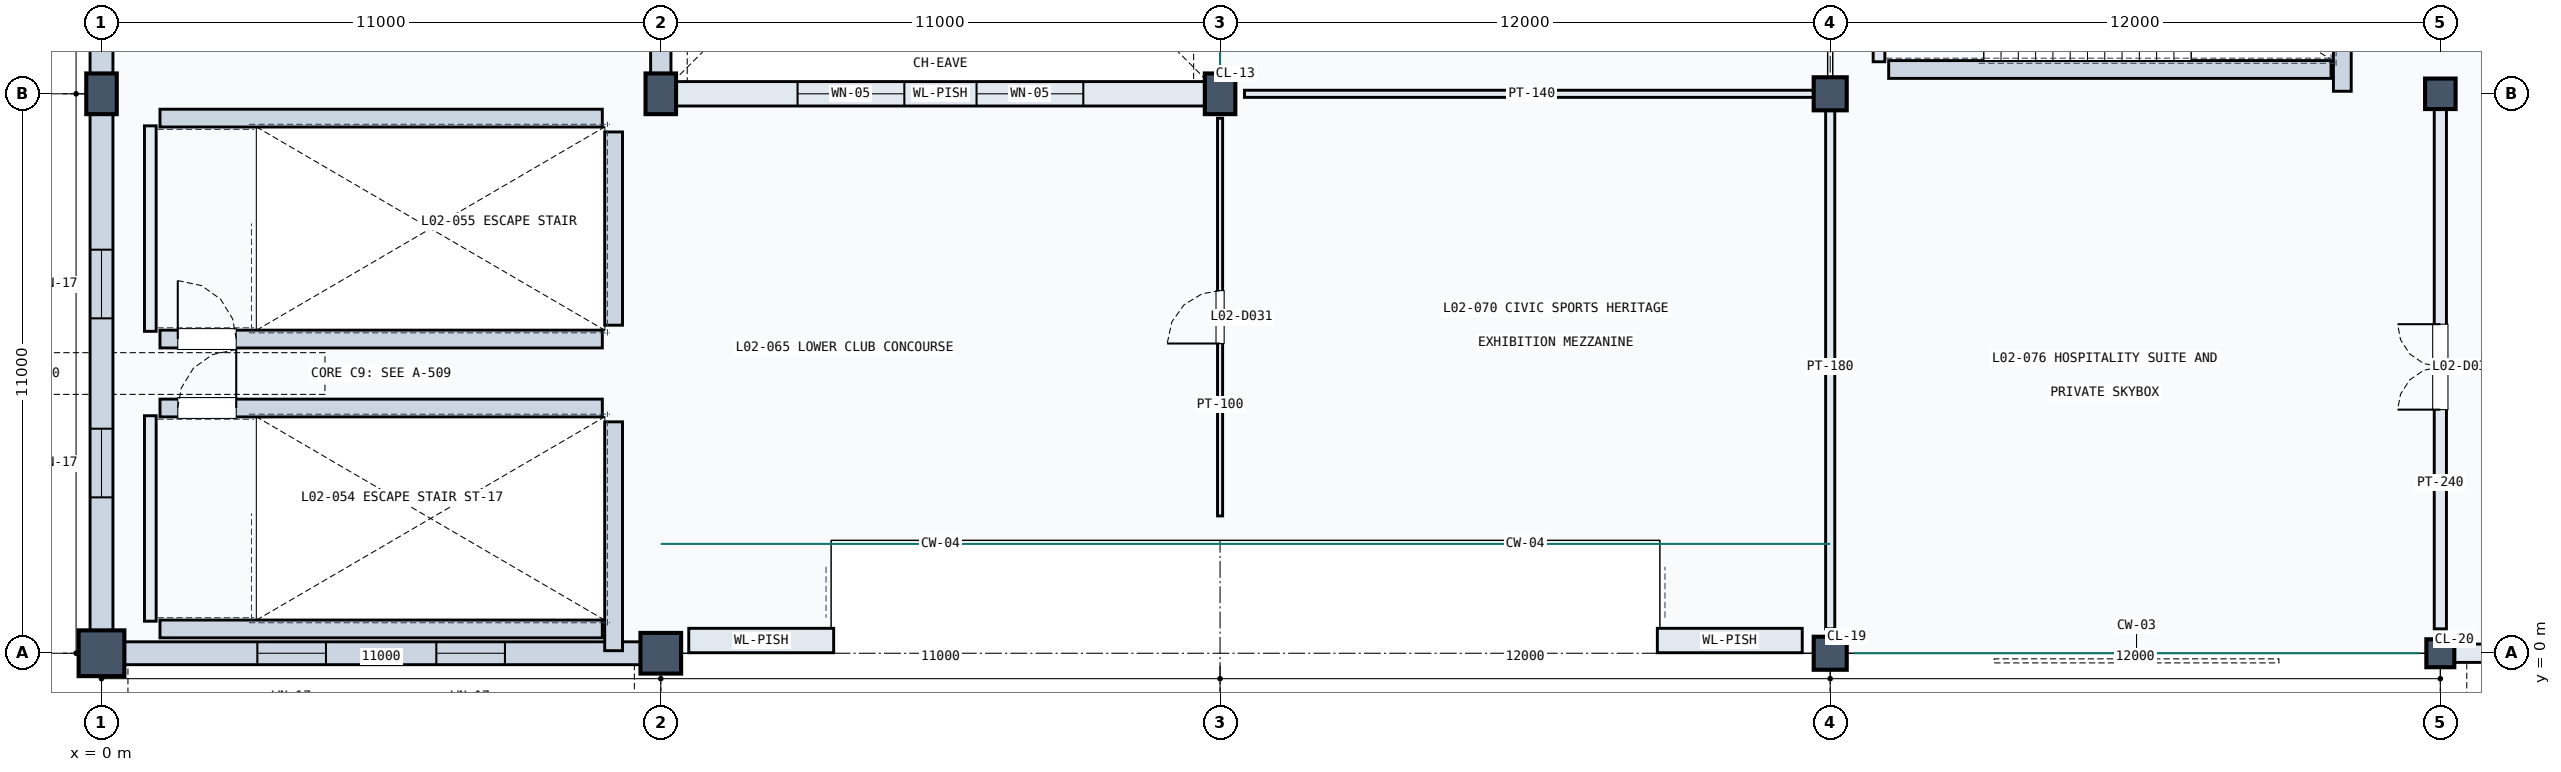
"""IFC4 building model, lengths in metres.
Left out: names, types, materials, properties, quantities, classifications, styles, units other than length and angle.
Written with IfcOpenShell. Run it as: python <this file> out.ifc"""

import sys

from ifc_helpers import new_model, si_unit, direction, frame, frame_2d, origin, origin_with_axes, origin_2d, place, context, subcontext, project, spatial, rectangle, circle, extrude, element, fill, save


model = new_model("IFC4")
c1 = context("Model", 3, precision=1e-05, world=origin(), true_north=direction((0.0, 1.0)))
c2 = subcontext(c1, "Body", "Model", "MODEL_VIEW")
j1 = project(units=[si_unit("LENGTHUNIT", "METRE"), si_unit("PLANEANGLEUNIT", "RADIAN")], contexts=[c1])
p1 = place(None, origin())
s1 = spatial("IfcSite", under=j1, at=p1, CompositionType="ELEMENT")
p2 = place(p1, origin())
s2 = spatial("IfcBuilding", under=s1, at=p2, CompositionType="ELEMENT")
p3 = place(p2, frame((0.0, 0.0, 10.2)))
s3 = spatial("IfcBuildingStorey", under=s2, at=p3, CompositionType="ELEMENT", Elevation=10.2)
p4 = place(p3, origin_with_axes())
e1 = element("IfcColumn", 1, at=p4, inside=s3, PredefinedType="COLUMN", context=c2, shape_type="SweptSolid", body=[
    extrude(circle(Radius=0.45, at=origin_2d()), origin(), (0.0, 0.0, 1.0), 4.5),
])
p5 = place(p3, frame((0.0, 11.0, 0.0), z_axis=(0.0, 0.0, 1.0), x_axis=(1.0, 0.0, 0.0)))
e2 = element("IfcColumn", 2, at=p5, inside=s3, PredefinedType="COLUMN", context=c2, shape_type="SweptSolid", body=[
    extrude(rectangle(XDim=0.6, YDim=0.8, at=origin_2d()), origin(), (0.0, 0.0, 1.0), 4.5),
])
p6 = place(p3, frame((11.0, 0.0, 0.0), z_axis=(0.0, 0.0, 1.0), x_axis=(1.0, 0.0, 0.0)))
e3 = element("IfcColumn", 3, at=p6, inside=s3, PredefinedType="COLUMN", context=c2, shape_type="SweptSolid", body=[
    extrude(circle(Radius=0.4, at=origin_2d()), origin(), (0.0, 0.0, 1.0), 4.5),
])
for number, where, z_axis, x_axis in (
    (4, (11.0, 11.0, 0.0), (0.0, 0.0, 1.0), (1.0, 0.0, 0.0)),
    (5, (22.0, 11.0, 0.0), (0.0, 0.0, 1.0), (1.0, 0.0, 0.0)),
):
    element("IfcColumn", number, at=place(p3, frame(where, z_axis=z_axis, x_axis=x_axis)), inside=s3, PredefinedType="COLUMN", context=c2, shape_type="SweptSolid", body=[
        extrude(rectangle(XDim=0.6, YDim=0.8, at=origin_2d()), origin(), (0.0, 0.0, 1.0), 4.5),
    ])
p7 = place(p3, frame((34.0, 0.0, 0.0), z_axis=(0.0, 0.0, 1.0), x_axis=(1.0, 0.0, 0.0)))
e6 = element("IfcColumn", 6, at=p7, inside=s3, PredefinedType="COLUMN", context=c2, shape_type="SweptSolid", body=[
    extrude(circle(Radius=0.325, at=origin_2d()), origin(), (0.0, 0.0, 1.0), 4.5),
])
p8 = place(p3, frame((34.0, 11.0, 0.0), z_axis=(0.0, 0.0, 1.0), x_axis=(1.0, 0.0, 0.0)))
e7 = element("IfcColumn", 7, at=p8, inside=s3, PredefinedType="COLUMN", context=c2, shape_type="SweptSolid", body=[
    extrude(rectangle(XDim=0.65, YDim=0.65, at=origin_2d()), origin(), (0.0, 0.0, 1.0), 4.5),
])
p9 = place(p3, frame((46.0, 0.0, 0.0), z_axis=(0.0, 0.0, 1.0), x_axis=(1.0, 0.0, 0.0)))
e8 = element("IfcColumn", 8, at=p9, inside=s3, PredefinedType="COLUMN", context=c2, shape_type="SweptSolid", body=[
    extrude(circle(Radius=0.275, at=origin_2d()), origin(), (0.0, 0.0, 1.0), 4.5),
])
p10 = place(p3, frame((46.0, 11.0, 0.0), z_axis=(0.0, 0.0, 1.0), x_axis=(1.0, 0.0, 0.0)))
e9 = element("IfcColumn", 9, at=p10, inside=s3, PredefinedType="COLUMN", context=c2, shape_type="SweptSolid", body=[
    extrude(rectangle(XDim=0.6, YDim=0.6, at=origin_2d()), origin(), (0.0, 0.0, 1.0), 4.5),
])
for number, where, z_axis, x_axis in (
    (10, (11.55, 0.25, 0.0), (0.0, 0.0, 1.0), (1.0, 0.0, 0.0)),
    (11, (30.6, 0.25, 0.0), (0.0, 0.0, 1.0), (1.0, 0.0, 0.0)),
):
    element("IfcWall", number, at=place(p3, frame(where, z_axis=z_axis, x_axis=x_axis)), inside=s3, PredefinedType="SOLIDWALL", context=c2, shape_type="SweptSolid", body=[
        extrude(rectangle(XDim=2.85, YDim=0.48, at=frame_2d((1.425, 0.0))), origin(), (0.0, 0.0, 1.0), 4.14),
    ])
p11 = place(p3, frame((0.22, 0.0, 0.0), z_axis=(0.0, 0.0, 1.0), x_axis=(1.0, 0.0, 0.0)))
e12 = element("IfcWall", 12, at=p11, inside=s3, PredefinedType="SOLIDWALL", context=c2, shape_type="SweptSolid", body=[
    extrude(rectangle(XDim=10.56, YDim=0.45, at=frame_2d((5.28, 0.0))), origin(), (0.0, 0.0, 1.0), 3.405),
])
p12 = place(p11, frame((2.845, 0.0, 0.8)))
e13 = element("IfcOpeningElement", 13, at=p12, cuts=e12, PredefinedType="OPENING", context=c2, shape_type="SweptSolid", body=[
    extrude(rectangle(XDim=1.35, YDim=2.1, at=frame_2d((0.675, 1.05))), frame((0.0, 0.235, 0.0), z_axis=(0.0, -1.0, 0.0), x_axis=(1.0, 0.0, 0.0)), (0.0, 0.0, 1.0), 0.47),
])
p13 = place(p11, frame((6.365, 0.0, 0.8)))
e14 = element("IfcOpeningElement", 14, at=p13, cuts=e12, PredefinedType="OPENING", context=c2, shape_type="SweptSolid", body=[
    extrude(rectangle(XDim=1.35, YDim=2.1, at=frame_2d((0.675, 1.05))), frame((0.0, 0.235, 0.0), z_axis=(0.0, -1.0, 0.0), x_axis=(1.0, 0.0, 0.0)), (0.0, 0.0, 1.0), 0.47),
])
p14 = place(p3, frame((0.0, 0.22, 0.0), z_axis=(0.0, 0.0, 1.0), x_axis=(0.0, 1.0, 0.0)))
e15 = element("IfcWall", 15, at=p14, inside=s3, PredefinedType="SOLIDWALL", context=c2, shape_type="SweptSolid", body=[
    extrude(rectangle(XDim=10.56, YDim=0.45, at=frame_2d((5.28, 0.0))), origin(), (0.0, 0.0, 1.0), 3.405),
])
p15 = place(p14, frame((2.845, 0.0, 0.8)))
e16 = element("IfcOpeningElement", 16, at=p15, cuts=e15, PredefinedType="OPENING", context=c2, shape_type="SweptSolid", body=[
    extrude(rectangle(XDim=1.35, YDim=2.1, at=frame_2d((0.675, 1.05))), frame((0.0, 0.235, 0.0), z_axis=(0.0, -1.0, 0.0), x_axis=(1.0, 0.0, 0.0)), (0.0, 0.0, 1.0), 0.47),
])
p16 = place(p14, frame((6.365, 0.0, 0.8)))
e17 = element("IfcOpeningElement", 17, at=p16, cuts=e15, PredefinedType="OPENING", context=c2, shape_type="SweptSolid", body=[
    extrude(rectangle(XDim=1.35, YDim=2.1, at=frame_2d((0.675, 1.05))), frame((0.0, 0.235, 0.0), z_axis=(0.0, -1.0, 0.0), x_axis=(1.0, 0.0, 0.0)), (0.0, 0.0, 1.0), 0.47),
])
p17 = place(p3, frame((0.0, 11.22, 0.0), z_axis=(0.0, 0.0, 1.0), x_axis=(0.0, 1.0, 0.0)))
e18 = element("IfcWall", 18, at=p17, inside=s3, PredefinedType="SOLIDWALL", context=c2, shape_type="SweptSolid", body=[
    extrude(rectangle(XDim=10.56, YDim=0.45, at=frame_2d((5.28, 0.0))), origin(), (0.0, 0.0, 1.0), 3.405),
])
p18 = place(p17, frame((2.845, 0.0, 0.8)))
e19 = element("IfcOpeningElement", 19, at=p18, cuts=e18, PredefinedType="OPENING", context=c2, shape_type="SweptSolid", body=[
    extrude(rectangle(XDim=1.35, YDim=2.1, at=frame_2d((0.675, 1.05))), frame((0.0, 0.235, 0.0), z_axis=(0.0, -1.0, 0.0), x_axis=(1.0, 0.0, 0.0)), (0.0, 0.0, 1.0), 0.47),
])
p19 = place(p17, frame((6.365, 0.0, 0.8)))
e20 = element("IfcOpeningElement", 20, at=p19, cuts=e18, PredefinedType="OPENING", context=c2, shape_type="SweptSolid", body=[
    extrude(rectangle(XDim=1.35, YDim=2.1, at=frame_2d((0.675, 1.05))), frame((0.0, 0.235, 0.0), z_axis=(0.0, -1.0, 0.0), x_axis=(1.0, 0.0, 0.0)), (0.0, 0.0, 1.0), 0.47),
])
p20 = place(p3, frame((11.0, 11.22, 0.0), z_axis=(0.0, 0.0, 1.0), x_axis=(0.0, 1.0, 0.0)))
e21 = element("IfcWall", 21, at=p20, inside=s3, PredefinedType="SOLIDWALL", context=c2, shape_type="SweptSolid", body=[
    extrude(rectangle(XDim=10.78, YDim=0.4, at=frame_2d((5.39, 0.0))), origin(), (0.0, 0.0, 1.0), 3.405),
])
p21 = place(p20, frame((2.918, 0.0, 0.8)))
e22 = element("IfcOpeningElement", 22, at=p21, cuts=e21, PredefinedType="OPENING", context=c2, shape_type="SweptSolid", body=[
    extrude(rectangle(XDim=1.35, YDim=2.1, at=frame_2d((0.675, 1.05))), frame((0.0, 0.21, 0.0), z_axis=(0.0, -1.0, 0.0), x_axis=(1.0, 0.0, 0.0)), (0.0, 0.0, 1.0), 0.42),
])
p22 = place(p20, frame((6.512, 0.0, 0.8)))
e23 = element("IfcOpeningElement", 23, at=p22, cuts=e21, PredefinedType="OPENING", context=c2, shape_type="SweptSolid", body=[
    extrude(rectangle(XDim=1.35, YDim=2.1, at=frame_2d((0.675, 1.05))), frame((0.0, 0.21, 0.0), z_axis=(0.0, -1.0, 0.0), x_axis=(1.0, 0.0, 0.0)), (0.0, 0.0, 1.0), 0.42),
])
p23 = place(p3, frame((11.22, 11.0, 0.0), z_axis=(0.0, 0.0, 1.0), x_axis=(1.0, 0.0, 0.0)))
e24 = element("IfcWall", 24, at=p23, inside=s3, PredefinedType="SOLIDWALL", context=c2, shape_type="SweptSolid", body=[
    extrude(rectangle(XDim=10.56, YDim=0.48, at=frame_2d((5.28, 0.0))), origin(), (0.0, 0.0, 1.0), 3.405),
])
p24 = place(p23, frame((2.47, 0.0, 0.9)))
e25 = element("IfcOpeningElement", 25, at=p24, cuts=e24, PredefinedType="OPENING", context=c2, shape_type="SweptSolid", body=[
    extrude(rectangle(XDim=2.1, YDim=1.8, at=frame_2d((1.05, 0.9))), frame((0.0, 0.25, 0.0), z_axis=(0.0, -1.0, 0.0), x_axis=(1.0, 0.0, 0.0)), (0.0, 0.0, 1.0), 0.5),
])
p25 = place(p23, frame((5.99, 0.0, 0.9)))
e26 = element("IfcOpeningElement", 26, at=p25, cuts=e24, PredefinedType="OPENING", context=c2, shape_type="SweptSolid", body=[
    extrude(rectangle(XDim=2.1, YDim=1.8, at=frame_2d((1.05, 0.9))), frame((0.0, 0.25, 0.0), z_axis=(0.0, -1.0, 0.0), x_axis=(1.0, 0.0, 0.0)), (0.0, 0.0, 1.0), 0.5),
])
p26 = place(p3, frame((46.22, 0.0, 0.0), z_axis=(0.0, 0.0, 1.0), x_axis=(1.0, 0.0, 0.0)))
e27 = element("IfcWall", 27, at=p26, inside=s3, PredefinedType="SOLIDWALL", context=c2, shape_type="SweptSolid", body=[
    extrude(rectangle(XDim=11.56, YDim=0.36, at=frame_2d((5.78, 0.0))), origin(), (0.0, 0.0, 1.0), 3.405),
])
p27 = place(p26, frame((4.38, 0.0, 0.95)))
e28 = element("IfcOpeningElement", 28, at=p27, cuts=e27, PredefinedType="OPENING", context=c2, shape_type="SweptSolid", body=[
    extrude(rectangle(XDim=2.8, YDim=1.5, at=frame_2d((1.4, 0.75))), frame((0.0, 0.19, 0.0), z_axis=(0.0, -1.0, 0.0), x_axis=(1.0, 0.0, 0.0)), (0.0, 0.0, 1.0), 0.38),
])
p28 = place(p3, frame((34.96, 11.63, 0.0), z_axis=(0.0, 0.0, 1.0), x_axis=(0.0, 1.0, 0.0)))
e29 = element("IfcWall", 29, at=p28, inside=s3, PredefinedType="SOLIDWALL", context=c2, shape_type="SweptSolid", body=[
    extrude(rectangle(XDim=4.08, YDim=0.23, at=frame_2d((2.04, 0.0))), origin(), (0.0, 0.0, 1.0), 4.14),
])
p29 = place(p3, frame((44.072, 11.05, 0.0), z_axis=(0.0, 0.0, 1.0), x_axis=(0.0, 1.0, 0.0)))
e30 = element("IfcWall", 30, at=p29, inside=s3, PredefinedType="SOLIDWALL", context=c2, shape_type="SweptSolid", body=[
    extrude(rectangle(XDim=4.54, YDim=0.35, at=frame_2d((2.27, 0.0))), origin(), (0.0, 0.0, 1.0), 4.14),
])
p30 = place(p3, frame((35.15, 11.478, 0.0), z_axis=(0.0, 0.0, 1.0), x_axis=(1.0, 0.0, 0.0)))
e31 = element("IfcWall", 31, at=p30, inside=s3, PredefinedType="SOLIDWALL", context=c2, shape_type="SweptSolid", body=[
    extrude(rectangle(XDim=8.7, YDim=0.35, at=frame_2d((4.35, 0.0))), origin(), (0.0, 0.0, 1.0), 4.14),
])
p31 = place(p3, frame((0.96, 0.63, 0.0), z_axis=(0.0, 0.0, 1.0), x_axis=(0.0, 1.0, 0.0)))
e32 = element("IfcWall", 32, at=p31, inside=s3, PredefinedType="SOLIDWALL", context=c2, shape_type="SweptSolid", body=[
    extrude(rectangle(XDim=4.04, YDim=0.23, at=frame_2d((2.02, 0.0))), origin(), (0.0, 0.0, 1.0), 4.14),
])
p32 = place(p3, frame((10.072, 0.05, 0.0), z_axis=(0.0, 0.0, 1.0), x_axis=(0.0, 1.0, 0.0)))
e33 = element("IfcWall", 33, at=p32, inside=s3, PredefinedType="SOLIDWALL", context=c2, shape_type="SweptSolid", body=[
    extrude(rectangle(XDim=4.5, YDim=0.35, at=frame_2d((2.25, 0.0))), origin(), (0.0, 0.0, 1.0), 4.14),
])
p33 = place(p3, frame((1.15, 0.478, 0.0), z_axis=(0.0, 0.0, 1.0), x_axis=(1.0, 0.0, 0.0)))
e34 = element("IfcWall", 34, at=p33, inside=s3, PredefinedType="SOLIDWALL", context=c2, shape_type="SweptSolid", body=[
    extrude(rectangle(XDim=8.7, YDim=0.35, at=frame_2d((4.35, 0.0))), origin(), (0.0, 0.0, 1.0), 4.14),
])
p34 = place(p3, frame((1.15, 4.822, 0.0), z_axis=(0.0, 0.0, 1.0), x_axis=(1.0, 0.0, 0.0)))
e35 = element("IfcWall", 35, at=p34, inside=s3, PredefinedType="SOLIDWALL", context=c2, shape_type="SweptSolid", body=[
    extrude(rectangle(XDim=8.7, YDim=0.35, at=frame_2d((4.35, 0.0))), origin(), (0.0, 0.0, 1.0), 4.14),
])
p35 = place(p34, frame((0.35, 0.0, 0.0)))
e36 = element("IfcOpeningElement", 36, at=p35, cuts=e35, PredefinedType="OPENING", context=c2, shape_type="SweptSolid", body=[
    extrude(rectangle(XDim=1.15, YDim=2.2, at=frame_2d((0.575, 1.1))), frame((0.0, 0.185, 0.0), z_axis=(0.0, -1.0, 0.0), x_axis=(1.0, 0.0, 0.0)), (0.0, 0.0, 1.0), 0.37),
])
p36 = place(p3, frame((0.96, 6.33, 0.0), z_axis=(0.0, 0.0, 1.0), x_axis=(0.0, 1.0, 0.0)))
e37 = element("IfcWall", 37, at=p36, inside=s3, PredefinedType="SOLIDWALL", context=c2, shape_type="SweptSolid", body=[
    extrude(rectangle(XDim=4.04, YDim=0.23, at=frame_2d((2.02, 0.0))), origin(), (0.0, 0.0, 1.0), 4.14),
])
p37 = place(p3, frame((10.072, 6.45, 0.0), z_axis=(0.0, 0.0, 1.0), x_axis=(0.0, 1.0, 0.0)))
e38 = element("IfcWall", 38, at=p37, inside=s3, PredefinedType="SOLIDWALL", context=c2, shape_type="SweptSolid", body=[
    extrude(rectangle(XDim=3.8, YDim=0.35, at=frame_2d((1.9, 0.0))), origin(), (0.0, 0.0, 1.0), 4.14),
])
p38 = place(p3, frame((1.15, 6.178, 0.0), z_axis=(0.0, 0.0, 1.0), x_axis=(1.0, 0.0, 0.0)))
e39 = element("IfcWall", 39, at=p38, inside=s3, PredefinedType="SOLIDWALL", context=c2, shape_type="SweptSolid", body=[
    extrude(rectangle(XDim=8.7, YDim=0.35, at=frame_2d((4.35, 0.0))), origin(), (0.0, 0.0, 1.0), 4.14),
])
p39 = place(p38, frame((0.35, 0.0, 0.0)))
e40 = element("IfcOpeningElement", 40, at=p39, cuts=e39, PredefinedType="OPENING", context=c2, shape_type="SweptSolid", body=[
    extrude(rectangle(XDim=1.15, YDim=2.2, at=frame_2d((0.575, 1.1))), frame((0.0, 0.185, 0.0), z_axis=(0.0, -1.0, 0.0), x_axis=(1.0, 0.0, 0.0)), (0.0, 0.0, 1.0), 0.37),
])
p40 = place(p3, frame((1.15, 10.522, 0.0), z_axis=(0.0, 0.0, 1.0), x_axis=(1.0, 0.0, 0.0)))
e41 = element("IfcWall", 41, at=p40, inside=s3, PredefinedType="SOLIDWALL", context=c2, shape_type="SweptSolid", body=[
    extrude(rectangle(XDim=8.7, YDim=0.35, at=frame_2d((4.35, 0.0))), origin(), (0.0, 0.0, 1.0), 4.14),
])
p41 = place(p3, frame((22.0, 2.7, 0.0), z_axis=(0.0, 0.0, 1.0), x_axis=(0.0, 1.0, 0.0)))
e42 = element("IfcWall", 42, at=p41, inside=s3, PredefinedType="PARTITIONING", context=c2, shape_type="SweptSolid", body=[
    extrude(rectangle(XDim=7.82, YDim=0.1, at=frame_2d((3.91, 0.0))), origin(), (0.0, 0.0, 1.0), 4.14),
])
p42 = place(p41, frame((3.39, 0.0, 0.0)))
e43 = element("IfcOpeningElement", 43, at=p42, cuts=e42, PredefinedType="OPENING", context=c2, shape_type="SweptSolid", body=[
    extrude(rectangle(XDim=1.04, YDim=2.15, at=frame_2d((0.52, 1.075))), frame((0.0, 0.06, 0.0), z_axis=(0.0, -1.0, 0.0), x_axis=(1.0, 0.0, 0.0)), (0.0, 0.0, 1.0), 0.12),
])
p43 = place(p3, frame((22.48, 11.0, 0.0), z_axis=(0.0, 0.0, 1.0), x_axis=(1.0, 0.0, 0.0)))
e44 = element("IfcWall", 44, at=p43, inside=s3, PredefinedType="PARTITIONING", context=c2, shape_type="SweptSolid", body=[
    extrude(rectangle(XDim=11.3, YDim=0.14, at=frame_2d((5.65, 0.0))), origin(), (0.0, 0.0, 1.0), 3.405),
])
p44 = place(p3, frame((46.0, 0.48, 0.0), z_axis=(0.0, 0.0, 1.0), x_axis=(0.0, 1.0, 0.0)))
e45 = element("IfcWall", 45, at=p44, inside=s3, PredefinedType="PARTITIONING", context=c2, shape_type="SweptSolid", body=[
    extrude(rectangle(XDim=10.3, YDim=0.24, at=frame_2d((5.15, 0.0))), origin(), (0.0, 0.0, 1.0), 3.39),
])
p45 = place(p44, frame((4.31, 0.0, 0.0)))
e46 = element("IfcOpeningElement", 46, at=p45, cuts=e45, PredefinedType="OPENING", context=c2, shape_type="SweptSolid", body=[
    extrude(rectangle(XDim=1.68, YDim=2.2, at=frame_2d((0.84, 1.1))), frame((0.0, 0.13, 0.0), z_axis=(0.0, -1.0, 0.0), x_axis=(1.0, 0.0, 0.0)), (0.0, 0.0, 1.0), 0.26),
])
p46 = place(p3, frame((34.0, 0.48, 0.0), z_axis=(0.0, 0.0, 1.0), x_axis=(0.0, 1.0, 0.0)))
e47 = element("IfcWall", 47, at=p46, inside=s3, PredefinedType="PARTITIONING", context=c2, shape_type="SweptSolid", body=[
    extrude(rectangle(XDim=10.3, YDim=0.18, at=frame_2d((5.15, 0.0))), origin(), (0.0, 0.0, 1.0), 3.405),
])
p47 = place(p12, origin())
e48 = element("IfcWindow", 48, at=p47, inside=s3, PartitioningType="SINGLE_PANEL", PredefinedType="WINDOW", context=c2, shape_type="SweptSolid", body=[
    extrude(rectangle(XDim=1.35, YDim=2.1, at=frame_2d((0.675, 1.05))), frame((0.0, 0.03, 0.0), z_axis=(0.0, -1.0, 0.0), x_axis=(1.0, 0.0, 0.0)), (0.0, 0.0, 1.0), 0.06),
])
fill(e13, e48)
p48 = place(p13, origin())
e49 = element("IfcWindow", 49, at=p48, inside=s3, PartitioningType="SINGLE_PANEL", PredefinedType="WINDOW", context=c2, shape_type="SweptSolid", body=[
    extrude(rectangle(XDim=1.35, YDim=2.1, at=frame_2d((0.675, 1.05))), frame((0.0, 0.03, 0.0), z_axis=(0.0, -1.0, 0.0), x_axis=(1.0, 0.0, 0.0)), (0.0, 0.0, 1.0), 0.06),
])
fill(e14, e49)
p49 = place(p15, origin())
e50 = element("IfcWindow", 50, at=p49, inside=s3, PartitioningType="SINGLE_PANEL", PredefinedType="WINDOW", context=c2, shape_type="SweptSolid", body=[
    extrude(rectangle(XDim=1.35, YDim=2.1, at=frame_2d((0.675, 1.05))), frame((0.0, 0.03, 0.0), z_axis=(0.0, -1.0, 0.0), x_axis=(1.0, 0.0, 0.0)), (0.0, 0.0, 1.0), 0.06),
])
fill(e16, e50)
p50 = place(p16, origin())
e51 = element("IfcWindow", 51, at=p50, inside=s3, PartitioningType="SINGLE_PANEL", PredefinedType="WINDOW", context=c2, shape_type="SweptSolid", body=[
    extrude(rectangle(XDim=1.35, YDim=2.1, at=frame_2d((0.675, 1.05))), frame((0.0, 0.03, 0.0), z_axis=(0.0, -1.0, 0.0), x_axis=(1.0, 0.0, 0.0)), (0.0, 0.0, 1.0), 0.06),
])
fill(e17, e51)
p51 = place(p24, origin())
e52 = element("IfcWindow", 52, at=p51, inside=s3, PartitioningType="SINGLE_PANEL", PredefinedType="WINDOW", context=c2, shape_type="SweptSolid", body=[
    extrude(rectangle(XDim=2.1, YDim=1.8, at=frame_2d((1.05, 0.9))), frame((0.0, 0.03, 0.0), z_axis=(0.0, -1.0, 0.0), x_axis=(1.0, 0.0, 0.0)), (0.0, 0.0, 1.0), 0.06),
])
fill(e25, e52)
p52 = place(p25, origin())
e53 = element("IfcWindow", 53, at=p52, inside=s3, PartitioningType="SINGLE_PANEL", PredefinedType="WINDOW", context=c2, shape_type="SweptSolid", body=[
    extrude(rectangle(XDim=2.1, YDim=1.8, at=frame_2d((1.05, 0.9))), frame((0.0, 0.03, 0.0), z_axis=(0.0, -1.0, 0.0), x_axis=(1.0, 0.0, 0.0)), (0.0, 0.0, 1.0), 0.06),
])
fill(e26, e53)
p53 = place(p35, origin())
e54 = element("IfcDoor", 54, at=p53, inside=s3, OperationType="SINGLE_SWING_RIGHT", PredefinedType="DOOR", context=c2, shape_type="SweptSolid", body=[
    extrude(rectangle(XDim=1.15, YDim=2.2, at=frame_2d((0.575, 1.1))), frame((0.0, 0.025, 0.0), z_axis=(0.0, -1.0, 0.0), x_axis=(1.0, 0.0, 0.0)), (0.0, 0.0, 1.0), 0.05),
])
fill(e36, e54)
p54 = place(p39, origin())
e55 = element("IfcDoor", 55, at=p54, inside=s3, OperationType="SINGLE_SWING_LEFT", PredefinedType="DOOR", context=c2, shape_type="SweptSolid", body=[
    extrude(rectangle(XDim=1.15, YDim=2.2, at=frame_2d((0.575, 1.1))), frame((0.0, 0.025, 0.0), z_axis=(0.0, -1.0, 0.0), x_axis=(1.0, 0.0, 0.0)), (0.0, 0.0, 1.0), 0.05),
])
fill(e40, e55)
p55 = place(p42, origin())
e56 = element("IfcDoor", 56, at=p55, inside=s3, OperationType="SINGLE_SWING_LEFT", PredefinedType="DOOR", context=c2, shape_type="SweptSolid", body=[
    extrude(rectangle(XDim=1.04, YDim=2.15, at=frame_2d((0.52, 1.075))), frame((0.0, 0.025, 0.0), z_axis=(0.0, -1.0, 0.0), x_axis=(1.0, 0.0, 0.0)), (0.0, 0.0, 1.0), 0.05),
])
fill(e43, e56)
p56 = place(p45, origin())
e57 = element("IfcDoor", 57, at=p56, inside=s3, OperationType="DOUBLE_DOOR_SINGLE_SWING", PredefinedType="DOOR", context=c2, shape_type="SweptSolid", body=[
    extrude(rectangle(XDim=1.68, YDim=2.2, at=frame_2d((0.84, 1.1))), frame((0.0, 0.025, 0.0), z_axis=(0.0, -1.0, 0.0), x_axis=(1.0, 0.0, 0.0)), (0.0, 0.0, 1.0), 0.05),
])
fill(e46, e57)
save(model, sys.argv[1])
